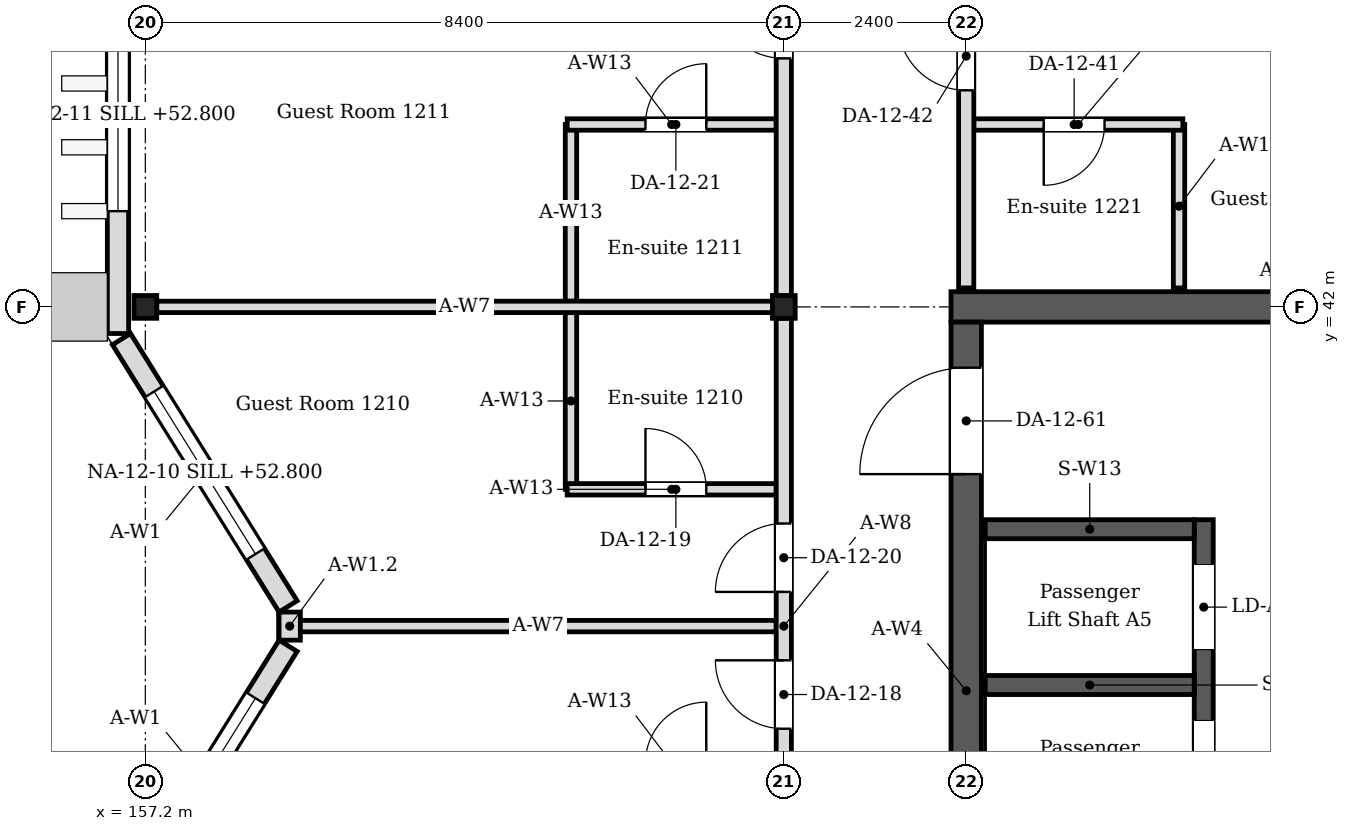
"""IFC4 building model, lengths in metres.
Left out: names, types, materials, properties, quantities, classifications, styles, units other than length and angle.
Written with IfcOpenShell. Run it as: python <this file> out.ifc"""

import sys

from ifc_helpers import new_model, si_unit, direction, frame, frame_2d, origin, origin_2d, place, context, subcontext, project, spatial, rectangle, i_section, extrude, element, fill, save


model = new_model("IFC4")
c1 = context("Model", 3, precision=1e-05, world=origin(), true_north=direction((0.0, 1.0)))
c2 = subcontext(c1, "Body", "Model", "MODEL_VIEW")
j1 = project(units=[si_unit("LENGTHUNIT", "METRE"), si_unit("PLANEANGLEUNIT", "RADIAN")], contexts=[c1])
p1 = place(None, origin())
s1 = spatial("IfcSite", under=j1, at=p1, CompositionType="ELEMENT")
p2 = place(p1, origin())
s2 = spatial("IfcBuilding", under=s1, at=p2, CompositionType="ELEMENT")
p3 = place(p2, frame((0.0, 0.0, 52.2)))
s3 = spatial("IfcBuildingStorey", under=s2, at=p3, CompositionType="ELEMENT", Elevation=52.2)
for number, where, z_axis, x_axis in (
    (1, (157.2, 42.0, 0.0), (0.0, 0.0, 1.0), (1.0, 0.0, 0.0)),
    (2, (165.6, 42.0, 0.0), (0.0, 0.0, 1.0), (1.0, 0.0, 0.0)),
):
    element("IfcColumn", number, at=place(p3, frame(where, z_axis=z_axis, x_axis=x_axis)), inside=s3, PredefinedType="COLUMN", context=c2, shape_type="SweptSolid", body=[
        extrude(i_section(OverallWidth=0.3, OverallDepth=0.3, WebThickness=0.01, FlangeThickness=0.015, FilletRadius=0.013, at=origin_2d()), origin(), (0.0, 0.0, 1.0), 4.2),
    ])
p4 = place(p3, frame((167.8, 42.0, 0.0), z_axis=(0.0, 0.0, 1.0), x_axis=(1.0, 0.0, 0.0)))
e3 = element("IfcWall", 3, at=p4, inside=s3, PredefinedType="SOLIDWALL", context=c2, shape_type="SweptSolid", body=[
    extrude(rectangle(XDim=8.8, YDim=0.4, at=frame_2d((4.4, 0.0))), origin(), (0.0, 0.0, 1.0), 4.05),
])
p5 = place(p3, frame((168.0, 25.4, 0.0), z_axis=(0.0, 0.0, 1.0), x_axis=(0.0, 1.0, 0.0)))
e4 = element("IfcWall", 4, at=p5, inside=s3, PredefinedType="SOLIDWALL", context=c2, shape_type="SweptSolid", body=[
    extrude(rectangle(XDim=16.4, YDim=0.4, at=frame_2d((8.2, 0.0))), origin(), (0.0, 0.0, 1.0), 4.05),
])
p6 = place(p5, frame((1.0, 0.0, 0.0)))
e5 = element("IfcOpeningElement", 5, at=p6, cuts=e4, PredefinedType="OPENING", context=c2, shape_type="SweptSolid", body=[
    extrude(rectangle(XDim=1.0, YDim=2.1, at=frame_2d((0.5, 1.05))), frame((0.0, 0.21, 0.0), z_axis=(0.0, -1.0, 0.0), x_axis=(1.0, 0.0, 0.0)), (0.0, 0.0, 1.0), 0.42),
])
p7 = place(p5, frame((14.4, 0.0, 0.0)))
e6 = element("IfcOpeningElement", 6, at=p7, cuts=e4, PredefinedType="OPENING", context=c2, shape_type="SweptSolid", body=[
    extrude(rectangle(XDim=1.4, YDim=2.1, at=frame_2d((0.7, 1.05))), frame((0.0, 0.21, 0.0), z_axis=(0.0, -1.0, 0.0), x_axis=(1.0, 0.0, 0.0)), (0.0, 0.0, 1.0), 0.42),
])
p8 = place(p3, frame((156.886, 34.024, 0.0), z_axis=(0.0, 0.0, 1.0), x_axis=(0.529018946142, 0.848610013271, 0.0)))
e7 = element("IfcWall", 7, at=p8, inside=s3, PredefinedType="SOLIDWALL", context=c2, shape_type="SweptSolid", body=[
    extrude(rectangle(XDim=4.144, YDim=0.28, at=frame_2d((2.072, 0.0))), origin(), (0.0, 0.0, 1.0), 4.05),
])
p9 = place(p8, frame((0.812, 0.0, 0.6)))
e8 = element("IfcOpeningElement", 8, at=p9, cuts=e7, PredefinedType="OPENING", context=c2, shape_type="SweptSolid", body=[
    extrude(rectangle(XDim=2.52, YDim=2.4, at=frame_2d((1.26, 1.2))), frame((0.0, 0.15, 0.0), z_axis=(0.0, -1.0, 0.0), x_axis=(1.0, 0.0, 0.0)), (0.0, 0.0, 1.0), 0.3),
])
p10 = place(p3, frame((159.079, 38.059, 0.0), z_axis=(0.0, 0.0, 1.0), x_axis=(-0.529018946142, 0.848610013271, 0.0)))
e9 = element("IfcWall", 9, at=p10, inside=s3, PredefinedType="SOLIDWALL", context=c2, shape_type="SweptSolid", body=[
    extrude(rectangle(XDim=4.144, YDim=0.28, at=frame_2d((2.072, 0.0))), origin(), (0.0, 0.0, 1.0), 4.05),
])
p11 = place(p10, frame((0.812, 0.0, 0.6)))
e10 = element("IfcOpeningElement", 10, at=p11, cuts=e9, PredefinedType="OPENING", context=c2, shape_type="SweptSolid", body=[
    extrude(rectangle(XDim=2.52, YDim=2.4, at=frame_2d((1.26, 1.2))), frame((0.0, 0.15, 0.0), z_axis=(0.0, -1.0, 0.0), x_axis=(1.0, 0.0, 0.0)), (0.0, 0.0, 1.0), 0.3),
])
p12 = place(p3, frame((159.1, 37.615, 0.0), z_axis=(0.0, 0.0, 1.0), x_axis=(0.0, 1.0, 0.0)))
e11 = element("IfcWall", 11, at=p12, inside=s3, PredefinedType="SOLIDWALL", context=c2, shape_type="SweptSolid", body=[
    extrude(rectangle(XDim=0.37, YDim=0.28, at=frame_2d((0.185, 0.0))), origin(), (0.0, 0.0, 1.0), 3.604),
])
p13 = place(p3, frame((156.84, 41.65, 0.0), z_axis=(0.0, 0.0, 1.0), x_axis=(0.0, 1.0, 0.0)))
e12 = element("IfcWall", 12, at=p13, inside=s3, PredefinedType="SOLIDWALL", context=c2, shape_type="SweptSolid", body=[
    extrude(rectangle(XDim=25.77, YDim=0.28, at=frame_2d((12.885, 0.0))), origin(), (0.0, 0.0, 1.0), 4.05),
])
p14 = place(p13, frame((1.61, 0.0, 0.6)))
e13 = element("IfcOpeningElement", 13, at=p14, cuts=e12, PredefinedType="OPENING", context=c2, shape_type="SweptSolid", body=[
    extrude(rectangle(XDim=2.52, YDim=2.4, at=frame_2d((1.26, 1.2))), frame((0.0, 0.15, 0.0), z_axis=(0.0, -1.0, 0.0), x_axis=(1.0, 0.0, 0.0)), (0.0, 0.0, 1.0), 0.3),
])
p15 = place(p13, frame((5.81, 0.0, 0.6)))
e14 = element("IfcOpeningElement", 14, at=p15, cuts=e12, PredefinedType="OPENING", context=c2, shape_type="SweptSolid", body=[
    extrude(rectangle(XDim=2.52, YDim=2.4, at=frame_2d((1.26, 1.2))), frame((0.0, 0.15, 0.0), z_axis=(0.0, -1.0, 0.0), x_axis=(1.0, 0.0, 0.0)), (0.0, 0.0, 1.0), 0.3),
])
p16 = place(p13, frame((9.59, 0.0, 0.6)))
e15 = element("IfcOpeningElement", 15, at=p16, cuts=e12, PredefinedType="OPENING", context=c2, shape_type="SweptSolid", body=[
    extrude(rectangle(XDim=2.52, YDim=2.4, at=frame_2d((1.26, 1.2))), frame((0.0, 0.15, 0.0), z_axis=(0.0, -1.0, 0.0), x_axis=(1.0, 0.0, 0.0)), (0.0, 0.0, 1.0), 0.3),
])
p17 = place(p13, frame((13.79, 0.0, 0.6)))
e16 = element("IfcOpeningElement", 16, at=p17, cuts=e12, PredefinedType="OPENING", context=c2, shape_type="SweptSolid", body=[
    extrude(rectangle(XDim=2.52, YDim=2.4, at=frame_2d((1.26, 1.2))), frame((0.0, 0.15, 0.0), z_axis=(0.0, -1.0, 0.0), x_axis=(1.0, 0.0, 0.0)), (0.0, 0.0, 1.0), 0.3),
])
p18 = place(p13, frame((18.41, 0.0, 0.6)))
e17 = element("IfcOpeningElement", 17, at=p18, cuts=e12, PredefinedType="OPENING", context=c2, shape_type="SweptSolid", body=[
    extrude(rectangle(XDim=2.52, YDim=2.4, at=frame_2d((1.26, 1.2))), frame((0.0, 0.15, 0.0), z_axis=(0.0, -1.0, 0.0), x_axis=(1.0, 0.0, 0.0)), (0.0, 0.0, 1.0), 0.3),
])
p19 = place(p13, frame((22.61, 0.0, 0.6)))
e18 = element("IfcOpeningElement", 18, at=p19, cuts=e12, PredefinedType="OPENING", context=c2, shape_type="SweptSolid", body=[
    extrude(rectangle(XDim=2.52, YDim=2.4, at=frame_2d((1.26, 1.2))), frame((0.0, 0.15, 0.0), z_axis=(0.0, -1.0, 0.0), x_axis=(1.0, 0.0, 0.0)), (0.0, 0.0, 1.0), 0.3),
])
p20 = place(p3, frame((162.8, 39.6, 0.0), z_axis=(0.0, 0.0, 1.0), x_axis=(0.0, 1.0, 0.0)))
e19 = element("IfcWall", 19, at=p20, inside=s3, PredefinedType="PARTITIONING", context=c2, shape_type="SweptSolid", body=[
    extrude(rectangle(XDim=2.325, YDim=0.15, at=frame_2d((1.163, 0.0))), origin(), (0.0, 0.0, 1.0), 4.05),
])
p21 = place(p3, frame((162.75, 39.6, 0.0), z_axis=(0.0, 0.0, 1.0), x_axis=(1.0, 0.0, 0.0)))
e20 = element("IfcWall", 20, at=p21, inside=s3, PredefinedType="PARTITIONING", context=c2, shape_type="SweptSolid", body=[
    extrude(rectangle(XDim=2.75, YDim=0.15, at=frame_2d((1.375, 0.0))), origin(), (0.0, 0.0, 1.0), 4.05),
])
p22 = place(p21, frame((1.03, 0.0, 0.0)))
e21 = element("IfcOpeningElement", 21, at=p22, cuts=e20, PredefinedType="OPENING", context=c2, shape_type="SweptSolid", body=[
    extrude(rectangle(XDim=0.8, YDim=2.1, at=frame_2d((0.4, 1.05))), frame((0.0, 0.085, 0.0), z_axis=(0.0, -1.0, 0.0), x_axis=(1.0, 0.0, 0.0)), (0.0, 0.0, 1.0), 0.17),
])
p23 = place(p3, frame((162.8, 42.075, 0.0), z_axis=(0.0, 0.0, 1.0), x_axis=(0.0, 1.0, 0.0)))
e22 = element("IfcWall", 22, at=p23, inside=s3, PredefinedType="PARTITIONING", context=c2, shape_type="SweptSolid", body=[
    extrude(rectangle(XDim=2.325, YDim=0.15, at=frame_2d((1.163, 0.0))), origin(), (0.0, 0.0, 1.0), 4.05),
])
p24 = place(p3, frame((162.75, 44.4, 0.0), z_axis=(0.0, 0.0, 1.0), x_axis=(1.0, 0.0, 0.0)))
e23 = element("IfcWall", 23, at=p24, inside=s3, PredefinedType="PARTITIONING", context=c2, shape_type="SweptSolid", body=[
    extrude(rectangle(XDim=2.75, YDim=0.15, at=frame_2d((1.375, 0.0))), origin(), (0.0, 0.0, 1.0), 4.05),
])
p25 = place(p24, frame((1.03, 0.0, 0.0)))
e24 = element("IfcOpeningElement", 24, at=p25, cuts=e23, PredefinedType="OPENING", context=c2, shape_type="SweptSolid", body=[
    extrude(rectangle(XDim=0.8, YDim=2.1, at=frame_2d((0.4, 1.05))), frame((0.0, 0.085, 0.0), z_axis=(0.0, -1.0, 0.0), x_axis=(1.0, 0.0, 0.0)), (0.0, 0.0, 1.0), 0.17),
])
p26 = place(p3, frame((170.8, 42.25, 0.0), z_axis=(0.0, 0.0, 1.0), x_axis=(0.0, 1.0, 0.0)))
e25 = element("IfcWall", 25, at=p26, inside=s3, PredefinedType="PARTITIONING", context=c2, shape_type="SweptSolid", body=[
    extrude(rectangle(XDim=2.15, YDim=0.15, at=frame_2d((1.075, 0.0))), origin(), (0.0, 0.0, 1.0), 4.05),
])
p27 = place(p3, frame((170.85, 44.4, 0.0), z_axis=(0.0, 0.0, 1.0), x_axis=(-1.0, 0.0, 0.0)))
e26 = element("IfcWall", 26, at=p27, inside=s3, PredefinedType="PARTITIONING", context=c2, shape_type="SweptSolid", body=[
    extrude(rectangle(XDim=2.75, YDim=0.15, at=frame_2d((1.375, 0.0))), origin(), (0.0, 0.0, 1.0), 4.05),
])
p28 = place(p27, frame((1.03, 0.0, 0.0)))
e27 = element("IfcOpeningElement", 27, at=p28, cuts=e26, PredefinedType="OPENING", context=c2, shape_type="SweptSolid", body=[
    extrude(rectangle(XDim=0.8, YDim=2.1, at=frame_2d((0.4, 1.05))), frame((0.0, 0.085, 0.0), z_axis=(0.0, -1.0, 0.0), x_axis=(1.0, 0.0, 0.0)), (0.0, 0.0, 1.0), 0.17),
])
p29 = place(p3, frame((157.35, 42.0, 0.0), z_axis=(0.0, 0.0, 1.0), x_axis=(1.0, 0.0, 0.0)))
e28 = element("IfcWall", 28, at=p29, inside=s3, PredefinedType="PARTITIONING", context=c2, shape_type="SweptSolid", body=[
    extrude(rectangle(XDim=8.1, YDim=0.15, at=frame_2d((4.05, 0.0))), origin(), (0.0, 0.0, 1.0), 3.604),
])
p30 = place(p3, frame((159.24, 37.8, 0.0), z_axis=(0.0, 0.0, 1.0), x_axis=(1.0, 0.0, 0.0)))
e29 = element("IfcWall", 29, at=p30, inside=s3, PredefinedType="PARTITIONING", context=c2, shape_type="SweptSolid", body=[
    extrude(rectangle(XDim=6.26, YDim=0.15, at=frame_2d((3.13, 0.0))), origin(), (0.0, 0.0, 1.0), 3.604),
])
p31 = place(p3, frame((165.6, 33.75, 0.0), z_axis=(0.0, 0.0, 1.0), x_axis=(0.0, 1.0, 0.0)))
e30 = element("IfcWall", 30, at=p31, inside=s3, PredefinedType="PARTITIONING", context=c2, shape_type="SweptSolid", body=[
    extrude(rectangle(XDim=8.1, YDim=0.2, at=frame_2d((4.05, 0.0))), origin(), (0.0, 0.0, 1.0), 3.45),
])
p32 = place(p31, frame((2.7, 0.0, 0.0)))
e31 = element("IfcOpeningElement", 31, at=p32, cuts=e30, PredefinedType="OPENING", context=c2, shape_type="SweptSolid", body=[
    extrude(rectangle(XDim=0.9, YDim=2.1, at=frame_2d((0.45, 1.05))), frame((0.0, 0.11, 0.0), z_axis=(0.0, -1.0, 0.0), x_axis=(1.0, 0.0, 0.0)), (0.0, 0.0, 1.0), 0.22),
])
p33 = place(p31, frame((4.5, 0.0, 0.0)))
e32 = element("IfcOpeningElement", 32, at=p33, cuts=e30, PredefinedType="OPENING", context=c2, shape_type="SweptSolid", body=[
    extrude(rectangle(XDim=0.9, YDim=2.1, at=frame_2d((0.45, 1.05))), frame((0.0, 0.11, 0.0), z_axis=(0.0, -1.0, 0.0), x_axis=(1.0, 0.0, 0.0)), (0.0, 0.0, 1.0), 0.22),
])
p34 = place(p3, frame((165.6, 42.15, 0.0), z_axis=(0.0, 0.0, 1.0), x_axis=(0.0, 1.0, 0.0)))
e33 = element("IfcWall", 33, at=p34, inside=s3, PredefinedType="PARTITIONING", context=c2, shape_type="SweptSolid", body=[
    extrude(rectangle(XDim=8.1, YDim=0.2, at=frame_2d((4.05, 0.0))), origin(), (0.0, 0.0, 1.0), 3.45),
])
p35 = place(p34, frame((3.12, 0.0, 0.0)))
e34 = element("IfcOpeningElement", 34, at=p35, cuts=e33, PredefinedType="OPENING", context=c2, shape_type="SweptSolid", body=[
    extrude(rectangle(XDim=0.9, YDim=2.1, at=frame_2d((0.45, 1.05))), frame((0.0, 0.11, 0.0), z_axis=(0.0, -1.0, 0.0), x_axis=(1.0, 0.0, 0.0)), (0.0, 0.0, 1.0), 0.22),
])
p36 = place(p34, frame((5.12, 0.0, 0.0)))
e35 = element("IfcOpeningElement", 35, at=p36, cuts=e33, PredefinedType="OPENING", context=c2, shape_type="SweptSolid", body=[
    extrude(rectangle(XDim=0.9, YDim=2.1, at=frame_2d((0.45, 1.05))), frame((0.0, 0.11, 0.0), z_axis=(0.0, -1.0, 0.0), x_axis=(1.0, 0.0, 0.0)), (0.0, 0.0, 1.0), 0.22),
])
p37 = place(p3, frame((168.0, 42.25, 0.0), z_axis=(0.0, 0.0, 1.0), x_axis=(0.0, 1.0, 0.0)))
e36 = element("IfcWall", 36, at=p37, inside=s3, PredefinedType="PARTITIONING", context=c2, shape_type="SweptSolid", body=[
    extrude(rectangle(XDim=8.0, YDim=0.2, at=frame_2d((4.0, 0.0))), origin(), (0.0, 0.0, 1.0), 3.45),
])
p38 = place(p37, frame((2.6, 0.0, 0.0)))
e37 = element("IfcOpeningElement", 37, at=p38, cuts=e36, PredefinedType="OPENING", context=c2, shape_type="SweptSolid", body=[
    extrude(rectangle(XDim=0.9, YDim=2.1, at=frame_2d((0.45, 1.05))), frame((0.0, 0.11, 0.0), z_axis=(0.0, -1.0, 0.0), x_axis=(1.0, 0.0, 0.0)), (0.0, 0.0, 1.0), 0.22),
])
p39 = place(p37, frame((4.4, 0.0, 0.0)))
e38 = element("IfcOpeningElement", 38, at=p39, cuts=e36, PredefinedType="OPENING", context=c2, shape_type="SweptSolid", body=[
    extrude(rectangle(XDim=0.9, YDim=2.1, at=frame_2d((0.45, 1.05))), frame((0.0, 0.11, 0.0), z_axis=(0.0, -1.0, 0.0), x_axis=(1.0, 0.0, 0.0)), (0.0, 0.0, 1.0), 0.22),
])
p40 = place(p3, frame((171.125, 28.3, 0.0), z_axis=(0.0, 0.0, 1.0), x_axis=(0.0, 1.0, 0.0)))
e39 = element("IfcWall", 39, at=p40, inside=s3, PredefinedType="SOLIDWALL", context=c2, shape_type="SweptSolid", body=[
    extrude(rectangle(XDim=10.9, YDim=0.25, at=frame_2d((5.45, 0.0))), origin(), (0.0, 0.0, 1.0), 4.05),
])
p41 = place(p40, frame((0.8, 0.0, 0.0)))
e40 = element("IfcOpeningElement", 40, at=p41, cuts=e39, PredefinedType="OPENING", context=c2, shape_type="SweptSolid", body=[
    extrude(rectangle(XDim=1.1, YDim=2.1, at=frame_2d((0.55, 1.05))), frame((0.0, 0.135, 0.0), z_axis=(0.0, -1.0, 0.0), x_axis=(1.0, 0.0, 0.0)), (0.0, 0.0, 1.0), 0.27),
])
p42 = place(p40, frame((3.05, 0.0, 0.0)))
e41 = element("IfcOpeningElement", 41, at=p42, cuts=e39, PredefinedType="OPENING", context=c2, shape_type="SweptSolid", body=[
    extrude(rectangle(XDim=1.1, YDim=2.1, at=frame_2d((0.55, 1.05))), frame((0.0, 0.135, 0.0), z_axis=(0.0, -1.0, 0.0), x_axis=(1.0, 0.0, 0.0)), (0.0, 0.0, 1.0), 0.27),
])
p43 = place(p40, frame((5.1, 0.0, 0.0)))
e42 = element("IfcOpeningElement", 42, at=p43, cuts=e39, PredefinedType="OPENING", context=c2, shape_type="SweptSolid", body=[
    extrude(rectangle(XDim=1.1, YDim=2.1, at=frame_2d((0.55, 1.05))), frame((0.0, 0.135, 0.0), z_axis=(0.0, -1.0, 0.0), x_axis=(1.0, 0.0, 0.0)), (0.0, 0.0, 1.0), 0.27),
])
p44 = place(p40, frame((7.15, 0.0, 0.0)))
e43 = element("IfcOpeningElement", 43, at=p44, cuts=e39, PredefinedType="OPENING", context=c2, shape_type="SweptSolid", body=[
    extrude(rectangle(XDim=1.1, YDim=2.1, at=frame_2d((0.55, 1.05))), frame((0.0, 0.135, 0.0), z_axis=(0.0, -1.0, 0.0), x_axis=(1.0, 0.0, 0.0)), (0.0, 0.0, 1.0), 0.27),
])
p45 = place(p40, frame((9.2, 0.0, 0.0)))
e44 = element("IfcOpeningElement", 44, at=p45, cuts=e39, PredefinedType="OPENING", context=c2, shape_type="SweptSolid", body=[
    extrude(rectangle(XDim=1.1, YDim=2.1, at=frame_2d((0.55, 1.05))), frame((0.0, 0.135, 0.0), z_axis=(0.0, -1.0, 0.0), x_axis=(1.0, 0.0, 0.0)), (0.0, 0.0, 1.0), 0.27),
])
for number, where, z_axis, x_axis in (
    (45, (168.25, 37.025, 0.0), (0.0, 0.0, 1.0), (1.0, 0.0, 0.0)),
    (46, (168.25, 39.075, 0.0), (0.0, 0.0, 1.0), (1.0, 0.0, 0.0)),
):
    element("IfcWall", number, at=place(p3, frame(where, z_axis=z_axis, x_axis=x_axis)), inside=s3, PredefinedType="SOLIDWALL", context=c2, shape_type="SweptSolid", body=[
        extrude(rectangle(XDim=2.75, YDim=0.25, at=frame_2d((1.375, 0.0))), origin(), (0.0, 0.0, 1.0), 4.05),
    ])
p46 = place(p9, origin())
e47 = element("IfcWindow", 47, at=p46, inside=s3, PartitioningType="SINGLE_PANEL", PredefinedType="WINDOW", context=c2, shape_type="SweptSolid", body=[
    extrude(rectangle(XDim=2.52, YDim=2.4, at=frame_2d((1.26, 1.2))), frame((0.0, 0.03, 0.0), z_axis=(0.0, -1.0, 0.0), x_axis=(1.0, 0.0, 0.0)), (0.0, 0.0, 1.0), 0.06),
])
fill(e8, e47)
p47 = place(p11, origin())
e48 = element("IfcWindow", 48, at=p47, inside=s3, PartitioningType="SINGLE_PANEL", PredefinedType="WINDOW", context=c2, shape_type="SweptSolid", body=[
    extrude(rectangle(XDim=2.52, YDim=2.4, at=frame_2d((1.26, 1.2))), frame((0.0, 0.03, 0.0), z_axis=(0.0, -1.0, 0.0), x_axis=(1.0, 0.0, 0.0)), (0.0, 0.0, 1.0), 0.06),
])
fill(e10, e48)
p48 = place(p14, origin())
e49 = element("IfcWindow", 49, at=p48, inside=s3, PartitioningType="SINGLE_PANEL", PredefinedType="WINDOW", context=c2, shape_type="SweptSolid", body=[
    extrude(rectangle(XDim=2.52, YDim=2.4, at=frame_2d((1.26, 1.2))), frame((0.0, 0.03, 0.0), z_axis=(0.0, -1.0, 0.0), x_axis=(1.0, 0.0, 0.0)), (0.0, 0.0, 1.0), 0.06),
])
fill(e13, e49)
p49 = place(p32, origin())
e50 = element("IfcDoor", 50, at=p49, inside=s3, OperationType="SINGLE_SWING_RIGHT", PredefinedType="DOOR", context=c2, shape_type="SweptSolid", body=[
    extrude(rectangle(XDim=0.9, YDim=2.1, at=frame_2d((0.45, 1.05))), frame((0.0, 0.025, 0.0), z_axis=(0.0, -1.0, 0.0), x_axis=(1.0, 0.0, 0.0)), (0.0, 0.0, 1.0), 0.05),
])
fill(e31, e50)
p50 = place(p22, origin())
e51 = element("IfcDoor", 51, at=p50, inside=s3, OperationType="SINGLE_SWING_LEFT", PredefinedType="DOOR", context=c2, shape_type="SweptSolid", body=[
    extrude(rectangle(XDim=0.8, YDim=2.1, at=frame_2d((0.4, 1.05))), frame((0.0, 0.025, 0.0), z_axis=(0.0, -1.0, 0.0), x_axis=(1.0, 0.0, 0.0)), (0.0, 0.0, 1.0), 0.05),
])
fill(e21, e51)
p51 = place(p33, origin())
e52 = element("IfcDoor", 52, at=p51, inside=s3, OperationType="SINGLE_SWING_LEFT", PredefinedType="DOOR", context=c2, shape_type="SweptSolid", body=[
    extrude(rectangle(XDim=0.9, YDim=2.1, at=frame_2d((0.45, 1.05))), frame((0.0, 0.025, 0.0), z_axis=(0.0, -1.0, 0.0), x_axis=(1.0, 0.0, 0.0)), (0.0, 0.0, 1.0), 0.05),
])
fill(e32, e52)
p52 = place(p25, origin())
e53 = element("IfcDoor", 53, at=p52, inside=s3, OperationType="SINGLE_SWING_RIGHT", PredefinedType="DOOR", context=c2, shape_type="SweptSolid", body=[
    extrude(rectangle(XDim=0.8, YDim=2.1, at=frame_2d((0.4, 1.05))), frame((0.0, 0.025, 0.0), z_axis=(0.0, -1.0, 0.0), x_axis=(1.0, 0.0, 0.0)), (0.0, 0.0, 1.0), 0.05),
])
fill(e24, e53)
p53 = place(p35, origin())
e54 = element("IfcDoor", 54, at=p53, inside=s3, OperationType="SINGLE_SWING_RIGHT", PredefinedType="DOOR", context=c2, shape_type="SweptSolid", body=[
    extrude(rectangle(XDim=0.9, YDim=2.1, at=frame_2d((0.45, 1.05))), frame((0.0, 0.025, 0.0), z_axis=(0.0, -1.0, 0.0), x_axis=(1.0, 0.0, 0.0)), (0.0, 0.0, 1.0), 0.05),
])
fill(e34, e54)
p54 = place(p28, origin())
e55 = element("IfcDoor", 55, at=p54, inside=s3, OperationType="SINGLE_SWING_RIGHT", PredefinedType="DOOR", context=c2, shape_type="SweptSolid", body=[
    extrude(rectangle(XDim=0.8, YDim=2.1, at=frame_2d((0.4, 1.05))), frame((0.0, 0.025, 0.0), z_axis=(0.0, -1.0, 0.0), x_axis=(1.0, 0.0, 0.0)), (0.0, 0.0, 1.0), 0.05),
])
fill(e27, e55)
p55 = place(p38, origin())
e56 = element("IfcDoor", 56, at=p55, inside=s3, OperationType="SINGLE_SWING_RIGHT", PredefinedType="DOOR", context=c2, shape_type="SweptSolid", body=[
    extrude(rectangle(XDim=0.9, YDim=2.1, at=frame_2d((0.45, 1.05))), frame((0.0, 0.025, 0.0), z_axis=(0.0, -1.0, 0.0), x_axis=(1.0, 0.0, 0.0)), (0.0, 0.0, 1.0), 0.05),
])
fill(e37, e56)
p56 = place(p44, origin())
e57 = element("IfcDoor", 57, at=p56, inside=s3, OperationType="SLIDING_TO_LEFT", PredefinedType="DOOR", context=c2, shape_type="SweptSolid", body=[
    extrude(rectangle(XDim=1.1, YDim=2.1, at=frame_2d((0.55, 1.05))), frame((0.0, 0.025, 0.0), z_axis=(0.0, -1.0, 0.0), x_axis=(1.0, 0.0, 0.0)), (0.0, 0.0, 1.0), 0.05),
])
fill(e43, e57)
p57 = place(p45, origin())
e58 = element("IfcDoor", 58, at=p57, inside=s3, OperationType="SLIDING_TO_LEFT", PredefinedType="DOOR", context=c2, shape_type="SweptSolid", body=[
    extrude(rectangle(XDim=1.1, YDim=2.1, at=frame_2d((0.55, 1.05))), frame((0.0, 0.025, 0.0), z_axis=(0.0, -1.0, 0.0), x_axis=(1.0, 0.0, 0.0)), (0.0, 0.0, 1.0), 0.05),
])
fill(e44, e58)
p58 = place(p7, origin())
e59 = element("IfcDoor", 59, at=p58, inside=s3, OperationType="DOUBLE_DOOR_DOUBLE_SWING", PredefinedType="DOOR", context=c2, shape_type="SweptSolid", body=[
    extrude(rectangle(XDim=1.4, YDim=2.1, at=frame_2d((0.7, 1.05))), frame((0.0, 0.025, 0.0), z_axis=(0.0, -1.0, 0.0), x_axis=(1.0, 0.0, 0.0)), (0.0, 0.0, 1.0), 0.05),
])
fill(e6, e59)
save(model, sys.argv[1])
